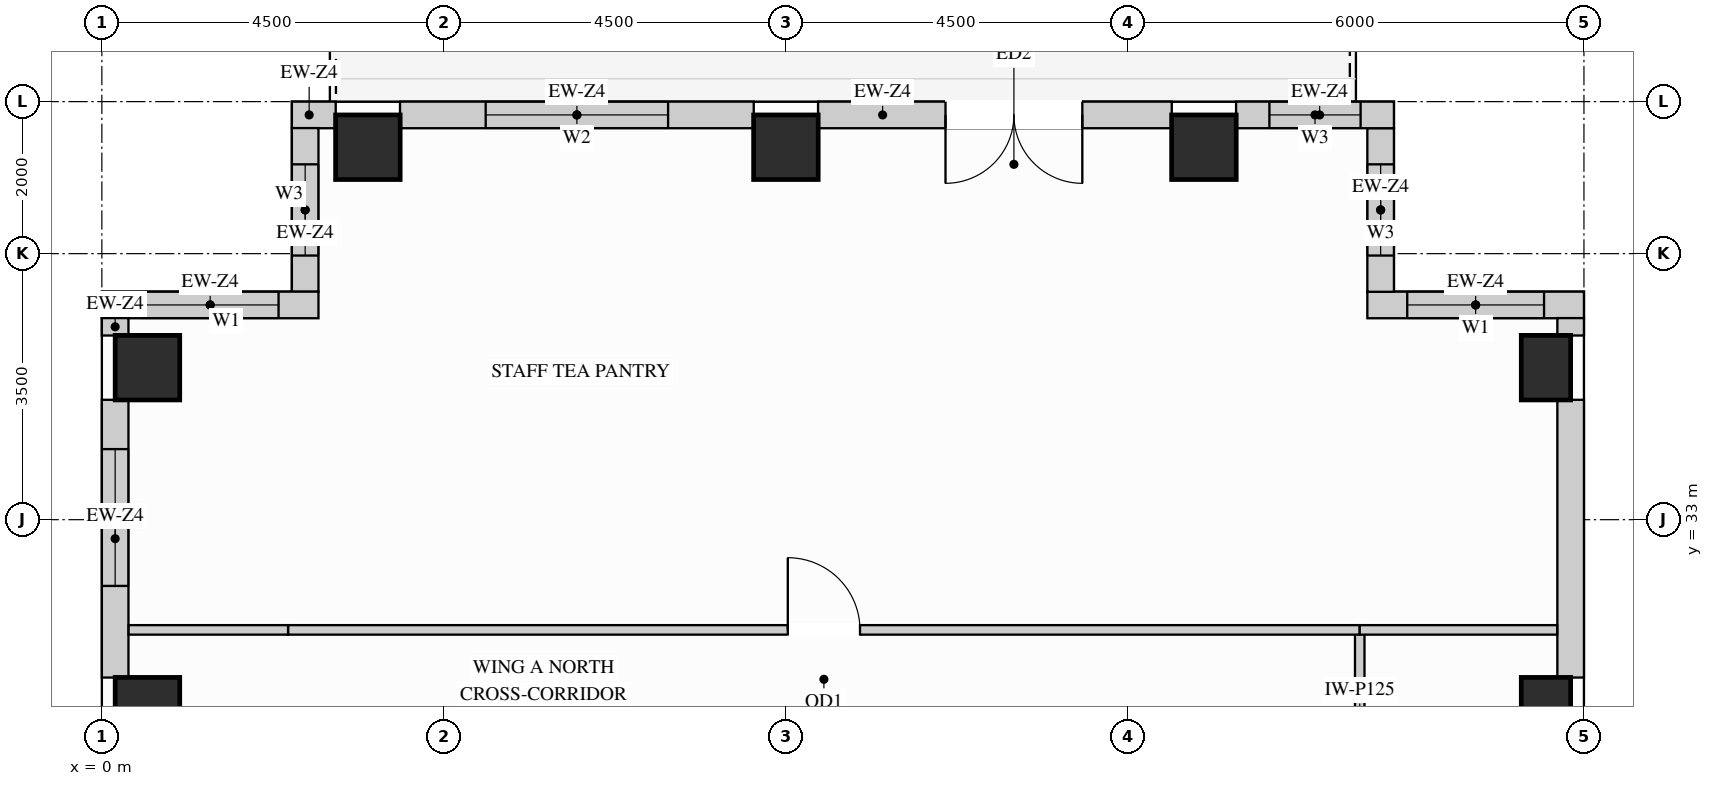
"""IFC4 building model, lengths in metres.
Left out: names, types, materials, properties, quantities, classifications, styles, units other than length and angle.
Written with IfcOpenShell. Run it as: python <this file> out.ifc"""

import sys

from ifc_helpers import new_model, si_unit, direction, frame, frame_2d, origin, origin_2d, place, context, subcontext, project, spatial, rectangle, extrude, source, transform, mapped, element, fill, save


model = new_model("IFC4")
c1 = context("Model", 3, precision=1e-05, world=origin(), true_north=direction((0.0, 1.0)))
c2 = subcontext(c1, "Body", "Model", "MODEL_VIEW")
j1 = project(units=[si_unit("LENGTHUNIT", "METRE"), si_unit("PLANEANGLEUNIT", "RADIAN")], contexts=[c1])
p1 = place(None, origin())
s1 = spatial("IfcSite", under=j1, at=p1, CompositionType="ELEMENT")
p2 = place(p1, origin())
s2 = spatial("IfcBuilding", under=s1, at=p2, CompositionType="ELEMENT")
p3 = place(p2, frame((0.0, 0.0, 212.4)))
s3 = spatial("IfcBuildingStorey", under=s2, at=p3, CompositionType="ELEMENT", Elevation=212.4)
m1 = source(origin(), c2, "Body", "SweptSolid", [
    extrude(rectangle(XDim=0.65, YDim=0.85, at=origin_2d()), origin(), (0.0, 0.0, 1.0), 3.4),
])
for number, where, z_axis, x_axis in (
    (1, (19.0, 30.5, 0.0), (0.0, 0.0, 1.0), (1.0, 0.0, 0.0)),
    (2, (19.0, 35.0, 0.0), (0.0, 0.0, 1.0), (1.0, 0.0, 0.0)),
):
    element("IfcColumn", number, at=place(p3, frame(where, z_axis=z_axis, x_axis=x_axis)), inside=s3, PredefinedType="COLUMN", context=c2, shape_type="MappedRepresentation", body=[
        mapped(m1, transform((0.0, 0.0, 0.0), x_axis=(1.0, 0.0, 0.0), y_axis=(0.0, 1.0, 0.0), z_axis=(0.0, 0.0, 1.0))),
    ])
m2 = source(origin(), c2, "Body", "SweptSolid", [
    extrude(rectangle(XDim=0.85, YDim=0.85, at=origin_2d()), origin(), (0.0, 0.0, 1.0), 3.4),
])
for number, where, z_axis, x_axis in (
    (3, (14.5, 37.9, 0.0), (0.0, 0.0, 1.0), (1.0, 0.0, 0.0)),
    (4, (3.5, 37.9, 0.0), (0.0, 0.0, 1.0), (1.0, 0.0, 0.0)),
    (5, (9.0, 37.9, 0.0), (0.0, 0.0, 1.0), (1.0, 0.0, 0.0)),
    (6, (0.6, 30.5, 0.0), (0.0, 0.0, 1.0), (1.0, 0.0, 0.0)),
    (7, (0.6, 35.0, 0.0), (0.0, 0.0, 1.0), (1.0, 0.0, 0.0)),
):
    element("IfcColumn", number, at=place(p3, frame(where, z_axis=z_axis, x_axis=x_axis)), inside=s3, PredefinedType="COLUMN", context=c2, shape_type="MappedRepresentation", body=[
        mapped(m2, transform((0.0, 0.0, 0.0), x_axis=(1.0, 0.0, 0.0), y_axis=(0.0, 1.0, 0.0), z_axis=(0.0, 0.0, 1.0))),
    ])
p4 = place(p3, frame((19.5, 35.825, 0.0), z_axis=(0.0, 0.0, 1.0), x_axis=(-1.0, 0.0, 0.0)))
e8 = element("IfcWall", 8, at=p4, inside=s3, PredefinedType="SOLIDWALL", context=c2, shape_type="SweptSolid", body=[
    extrude(rectangle(XDim=2.85, YDim=0.35, at=frame_2d((1.425, 0.0))), origin(), (0.0, 0.0, 1.0), 3.385),
])
p5 = place(p4, frame((0.525, 0.0, 0.78)))
e9 = element("IfcOpeningElement", 9, at=p5, cuts=e8, PredefinedType="OPENING", context=c2, shape_type="SweptSolid", body=[
    extrude(rectangle(XDim=1.8, YDim=2.1, at=frame_2d((0.9, 1.05))), frame((0.0, 0.185, 0.0), z_axis=(0.0, -1.0, 0.0), x_axis=(1.0, 0.0, 0.0)), (0.0, 0.0, 1.0), 0.37),
])
p6 = place(p3, frame((16.825, 35.998, 0.0), z_axis=(0.0, 0.0, 1.0), x_axis=(0.0, 1.0, 0.0)))
e10 = element("IfcWall", 10, at=p6, inside=s3, PredefinedType="SOLIDWALL", context=c2, shape_type="SweptSolid", body=[
    extrude(rectangle(XDim=2.154, YDim=0.35, at=frame_2d((1.077, 0.0))), origin(), (0.0, 0.0, 1.0), 3.385),
])
p7 = place(p6, frame((0.477, 0.0, 0.78)))
e11 = element("IfcOpeningElement", 11, at=p7, cuts=e10, PredefinedType="OPENING", context=c2, shape_type="SweptSolid", body=[
    extrude(rectangle(XDim=1.2, YDim=2.1, at=frame_2d((0.6, 1.05))), frame((0.0, 0.185, 0.0), z_axis=(0.0, -1.0, 0.0), x_axis=(1.0, 0.0, 0.0)), (0.0, 0.0, 1.0), 0.37),
])
p8 = place(p3, frame((17.0, 38.325, 0.0), z_axis=(0.0, 0.0, 1.0), x_axis=(-1.0, 0.0, 0.0)))
e12 = element("IfcWall", 12, at=p8, inside=s3, PredefinedType="SOLIDWALL", context=c2, shape_type="SweptSolid", body=[
    extrude(rectangle(XDim=2.077, YDim=0.35, at=frame_2d((1.039, 0.0))), origin(), (0.0, 0.0, 1.0), 3.385),
])
p9 = place(p8, frame((0.438, 0.0, 0.78)))
e13 = element("IfcOpeningElement", 13, at=p9, cuts=e12, PredefinedType="OPENING", context=c2, shape_type="SweptSolid", body=[
    extrude(rectangle(XDim=1.2, YDim=2.1, at=frame_2d((0.6, 1.05))), frame((0.0, 0.185, 0.0), z_axis=(0.0, -1.0, 0.0), x_axis=(1.0, 0.0, 0.0)), (0.0, 0.0, 1.0), 0.37),
])
p10 = place(p3, frame((14.077, 38.325, 0.0), z_axis=(0.0, 0.0, 1.0), x_axis=(-1.0, 0.0, 0.0)))
e14 = element("IfcWall", 14, at=p10, inside=s3, PredefinedType="SOLIDWALL", context=c2, shape_type="SweptSolid", body=[
    extrude(rectangle(XDim=4.654, YDim=0.35, at=frame_2d((2.327, 0.0))), origin(), (0.0, 0.0, 1.0), 3.385),
])
p11 = place(p10, frame((1.177, 0.0, 0.0)))
e15 = element("IfcOpeningElement", 15, at=p11, cuts=e14, PredefinedType="OPENING", context=c2, shape_type="SweptSolid", body=[
    extrude(rectangle(XDim=1.8, YDim=2.2, at=frame_2d((0.9, 1.1))), frame((0.0, 0.185, 0.0), z_axis=(0.0, -1.0, 0.0), x_axis=(1.0, 0.0, 0.0)), (0.0, 0.0, 1.0), 0.37),
])
p12 = place(p3, frame((8.577, 38.325, 0.0), z_axis=(0.0, 0.0, 1.0), x_axis=(-1.0, 0.0, 0.0)))
e16 = element("IfcWall", 16, at=p12, inside=s3, PredefinedType="SOLIDWALL", context=c2, shape_type="SweptSolid", body=[
    extrude(rectangle(XDim=4.654, YDim=0.35, at=frame_2d((2.327, 0.0))), origin(), (0.0, 0.0, 1.0), 3.385),
])
p13 = place(p12, frame((1.127, 0.0, 0.78)))
e17 = element("IfcOpeningElement", 17, at=p13, cuts=e16, PredefinedType="OPENING", context=c2, shape_type="SweptSolid", body=[
    extrude(rectangle(XDim=2.4, YDim=2.1, at=frame_2d((1.2, 1.05))), frame((0.0, 0.185, 0.0), z_axis=(0.0, -1.0, 0.0), x_axis=(1.0, 0.0, 0.0)), (0.0, 0.0, 1.0), 0.37),
])
m3 = source(origin(), c2, "Body", "SweptSolid", [
    extrude(rectangle(XDim=0.577, YDim=0.35, at=frame_2d((0.289, 0.0))), origin(), (0.0, 0.0, 1.0), 3.385),
])
p14 = place(p3, frame((3.077, 38.325, 0.0), z_axis=(0.0, 0.0, 1.0), x_axis=(-1.0, 0.0, 0.0)))
e18 = element("IfcWall", 18, at=p14, inside=s3, PredefinedType="SOLIDWALL", context=c2, shape_type="MappedRepresentation", body=[
    mapped(m3, transform((0.0, 0.0, 0.0), x_axis=(1.0, 0.0, 0.0), y_axis=(0.0, 1.0, 0.0), z_axis=(0.0, 0.0, 1.0))),
])
p15 = place(p3, frame((2.675, 38.152, 0.0), z_axis=(0.0, 0.0, 1.0), x_axis=(0.0, -1.0, 0.0)))
e19 = element("IfcWall", 19, at=p15, inside=s3, PredefinedType="SOLIDWALL", context=c2, shape_type="SweptSolid", body=[
    extrude(rectangle(XDim=2.154, YDim=0.35, at=frame_2d((1.077, 0.0))), origin(), (0.0, 0.0, 1.0), 3.385),
])
p16 = place(p15, frame((0.477, 0.0, 0.78)))
e20 = element("IfcOpeningElement", 20, at=p16, cuts=e19, PredefinedType="OPENING", context=c2, shape_type="SweptSolid", body=[
    extrude(rectangle(XDim=1.2, YDim=2.1, at=frame_2d((0.6, 1.05))), frame((0.0, 0.185, 0.0), z_axis=(0.0, -1.0, 0.0), x_axis=(1.0, 0.0, 0.0)), (0.0, 0.0, 1.0), 0.37),
])
p17 = place(p3, frame((2.85, 35.825, 0.0), z_axis=(0.0, 0.0, 1.0), x_axis=(-1.0, 0.0, 0.0)))
e21 = element("IfcWall", 21, at=p17, inside=s3, PredefinedType="SOLIDWALL", context=c2, shape_type="SweptSolid", body=[
    extrude(rectangle(XDim=2.85, YDim=0.35, at=frame_2d((1.425, 0.0))), origin(), (0.0, 0.0, 1.0), 3.385),
])
p18 = place(p17, frame((0.525, 0.0, 0.78)))
e22 = element("IfcOpeningElement", 22, at=p18, cuts=e21, PredefinedType="OPENING", context=c2, shape_type="SweptSolid", body=[
    extrude(rectangle(XDim=1.8, YDim=2.1, at=frame_2d((0.9, 1.05))), frame((0.0, 0.185, 0.0), z_axis=(0.0, -1.0, 0.0), x_axis=(1.0, 0.0, 0.0)), (0.0, 0.0, 1.0), 0.37),
])
m4 = source(origin(), c2, "Body", "SweptSolid", [
    extrude(rectangle(XDim=0.229, YDim=0.35, at=frame_2d((0.115, 0.0))), origin(), (0.0, 0.0, 1.0), 3.385),
])
p19 = place(p3, frame((0.175, 35.652, 0.0), z_axis=(0.0, 0.0, 1.0), x_axis=(0.0, -1.0, 0.0)))
e23 = element("IfcWall", 23, at=p19, inside=s3, PredefinedType="SOLIDWALL", context=c2, shape_type="MappedRepresentation", body=[
    mapped(m4, transform((0.0, 0.0, 0.0), x_axis=(1.0, 0.0, 0.0), y_axis=(0.0, 1.0, 0.0), z_axis=(0.0, 0.0, 1.0))),
])
p20 = place(p3, frame((0.175, 34.577, 0.0), z_axis=(0.0, 0.0, 1.0), x_axis=(0.0, -1.0, 0.0)))
e24 = element("IfcWall", 24, at=p20, inside=s3, PredefinedType="SOLIDWALL", context=c2, shape_type="SweptSolid", body=[
    extrude(rectangle(XDim=3.654, YDim=0.35, at=frame_2d((1.827, 0.0))), origin(), (0.0, 0.0, 1.0), 3.385),
])
p21 = place(p20, frame((0.648, 0.0, 0.78)))
e25 = element("IfcOpeningElement", 25, at=p21, cuts=e24, PredefinedType="OPENING", context=c2, shape_type="SweptSolid", body=[
    extrude(rectangle(XDim=1.8, YDim=2.1, at=frame_2d((0.9, 1.05))), frame((0.0, 0.185, 0.0), z_axis=(0.0, -1.0, 0.0), x_axis=(1.0, 0.0, 0.0)), (0.0, 0.0, 1.0), 0.37),
])
m5 = source(origin(), c2, "Body", "SweptSolid", [
    extrude(rectangle(XDim=3.654, YDim=0.35, at=frame_2d((1.827, 0.0))), origin(), (0.0, 0.0, 1.0), 2.619),
])
p22 = place(p3, frame((19.325, 30.923, 0.0), z_axis=(0.0, 0.0, 1.0), x_axis=(0.0, 1.0, 0.0)))
e26 = element("IfcWall", 26, at=p22, inside=s3, PredefinedType="SOLIDWALL", context=c2, shape_type="MappedRepresentation", body=[
    mapped(m5, transform((0.0, 0.0, 0.0), x_axis=(1.0, 0.0, 0.0), y_axis=(0.0, 1.0, 0.0), z_axis=(0.0, 0.0, 1.0))),
])
p23 = place(p3, frame((19.325, 35.423, 0.0), z_axis=(0.0, 0.0, 1.0), x_axis=(0.0, 1.0, 0.0)))
e27 = element("IfcWall", 27, at=p23, inside=s3, PredefinedType="SOLIDWALL", context=c2, shape_type="MappedRepresentation", body=[
    mapped(m4, transform((0.0, 0.0, 0.0), x_axis=(1.0, 0.0, 0.0), y_axis=(0.0, 1.0, 0.0), z_axis=(0.0, 0.0, 1.0))),
])
p24 = place(p3, frame((16.55, 26.05, 0.0), z_axis=(0.0, 0.0, 1.0), x_axis=(0.0, 1.0, 0.0)))
e28 = element("IfcWall", 28, at=p24, inside=s3, PredefinedType="PARTITIONING", context=c2, shape_type="SweptSolid", body=[
    extrude(rectangle(XDim=5.5, YDim=0.125, at=frame_2d((2.75, 0.0))), origin(), (0.0, 0.0, 1.0), 3.385),
])
p25 = place(p24, frame((2.275, 0.0, 0.0)))
e29 = element("IfcOpeningElement", 29, at=p25, cuts=e28, PredefinedType="OPENING", context=c2, shape_type="SweptSolid", body=[
    extrude(rectangle(XDim=0.95, YDim=2.15, at=frame_2d((0.475, 1.075))), frame((0.0, 0.073, 0.0), z_axis=(0.0, -1.0, 0.0), x_axis=(1.0, 0.0, 0.0)), (0.0, 0.0, 1.0), 0.145),
])
p26 = place(p3, frame((2.45, 31.55, 0.0), z_axis=(0.0, 0.0, 1.0), x_axis=(1.0, 0.0, 0.0)))
e30 = element("IfcWall", 30, at=p26, inside=s3, PredefinedType="PARTITIONING", context=c2, shape_type="SweptSolid", body=[
    extrude(rectangle(XDim=14.1, YDim=0.125, at=frame_2d((7.05, 0.0))), origin(), (0.0, 0.0, 1.0), 3.385),
])
p27 = place(p26, frame((6.575, 0.0, 0.0)))
e31 = element("IfcOpeningElement", 31, at=p27, cuts=e30, PredefinedType="OPENING", context=c2, shape_type="SweptSolid", body=[
    extrude(rectangle(XDim=0.95, YDim=2.15, at=frame_2d((0.475, 1.075))), frame((0.0, 0.073, 0.0), z_axis=(0.0, -1.0, 0.0), x_axis=(1.0, 0.0, 0.0)), (0.0, 0.0, 1.0), 0.145),
])
m6 = source(origin(), c2, "Body", "SweptSolid", [
    extrude(rectangle(XDim=2.598, YDim=0.125, at=frame_2d((1.299, 0.0))), origin(), (0.0, 0.0, 1.0), 3.385),
])
p28 = place(p3, frame((16.55, 31.55, 0.0), z_axis=(0.0, 0.0, 1.0), x_axis=(1.0, 0.0, 0.0)))
e32 = element("IfcWall", 32, at=p28, inside=s3, PredefinedType="PARTITIONING", context=c2, shape_type="MappedRepresentation", body=[
    mapped(m6, transform((0.0, 0.0, 0.0), x_axis=(1.0, 0.0, 0.0), y_axis=(0.0, 1.0, 0.0), z_axis=(0.0, 0.0, 1.0))),
])
m7 = source(origin(), c2, "Body", "SweptSolid", [
    extrude(rectangle(XDim=2.098, YDim=0.125, at=frame_2d((1.049, 0.0))), origin(), (0.0, 0.0, 1.0), 3.385),
])
p29 = place(p3, frame((0.352, 31.55, 0.0), z_axis=(0.0, 0.0, 1.0), x_axis=(1.0, 0.0, 0.0)))
e33 = element("IfcWall", 33, at=p29, inside=s3, PredefinedType="PARTITIONING", context=c2, shape_type="MappedRepresentation", body=[
    mapped(m7, transform((0.0, 0.0, 0.0), x_axis=(1.0, 0.0, 0.0), y_axis=(0.0, 1.0, 0.0), z_axis=(0.0, 0.0, 1.0))),
])
m8 = source(origin(), c2, "Body", "SweptSolid", [
    extrude(rectangle(XDim=1.8, YDim=2.2, at=frame_2d((0.9, 1.1))), frame((0.0, 0.025, 0.0), z_axis=(0.0, -1.0, 0.0), x_axis=(1.0, 0.0, 0.0)), (0.0, 0.0, 1.0), 0.05),
])
p30 = place(p11, frame((1.8, 0.0, 0.0), z_axis=(0.0, 0.0, 1.0), x_axis=(-1.0, 0.0, 0.0)))
e34 = element("IfcDoor", 34, at=p30, inside=s3, OperationType="DOUBLE_DOOR_SINGLE_SWING", PredefinedType="DOOR", context=c2, shape_type="MappedRepresentation", body=[
    mapped(m8, transform((0.0, 0.0, 0.0), x_axis=(1.0, 0.0, 0.0), y_axis=(0.0, 1.0, 0.0), z_axis=(0.0, 0.0, 1.0))),
])
fill(e15, e34)
m9 = source(origin(), c2, "Body", "SweptSolid", [
    extrude(rectangle(XDim=0.95, YDim=2.15, at=frame_2d((0.475, 1.075))), frame((0.0, 0.025, 0.0), z_axis=(0.0, -1.0, 0.0), x_axis=(1.0, 0.0, 0.0)), (0.0, 0.0, 1.0), 0.05),
])
p31 = place(p27, origin())
e35 = element("IfcDoor", 35, at=p31, inside=s3, OperationType="SINGLE_SWING_LEFT", PredefinedType="DOOR", context=c2, shape_type="MappedRepresentation", body=[
    mapped(m9, transform((0.0, 0.0, 0.0), x_axis=(1.0, 0.0, 0.0), y_axis=(0.0, 1.0, 0.0), z_axis=(0.0, 0.0, 1.0))),
])
fill(e31, e35)
m10 = source(origin(), c2, "Body", "SweptSolid", [
    extrude(rectangle(XDim=1.8, YDim=2.1, at=frame_2d((0.9, 1.05))), frame((0.0, 0.03, 0.0), z_axis=(0.0, -1.0, 0.0), x_axis=(1.0, 0.0, 0.0)), (0.0, 0.0, 1.0), 0.06),
])
p32 = place(p5, origin())
e36 = element("IfcWindow", 36, at=p32, inside=s3, PartitioningType="SINGLE_PANEL", PredefinedType="WINDOW", context=c2, shape_type="MappedRepresentation", body=[
    mapped(m10, transform((0.0, 0.0, 0.0), x_axis=(1.0, 0.0, 0.0), y_axis=(0.0, 1.0, 0.0), z_axis=(0.0, 0.0, 1.0))),
])
fill(e9, e36)
p33 = place(p18, origin())
e37 = element("IfcWindow", 37, at=p33, inside=s3, PartitioningType="SINGLE_PANEL", PredefinedType="WINDOW", context=c2, shape_type="MappedRepresentation", body=[
    mapped(m10, transform((0.0, 0.0, 0.0), x_axis=(1.0, 0.0, 0.0), y_axis=(0.0, 1.0, 0.0), z_axis=(0.0, 0.0, 1.0))),
])
fill(e22, e37)
p34 = place(p21, origin())
e38 = element("IfcWindow", 38, at=p34, inside=s3, PartitioningType="SINGLE_PANEL", PredefinedType="WINDOW", context=c2, shape_type="MappedRepresentation", body=[
    mapped(m10, transform((0.0, 0.0, 0.0), x_axis=(1.0, 0.0, 0.0), y_axis=(0.0, 1.0, 0.0), z_axis=(0.0, 0.0, 1.0))),
])
fill(e25, e38)
m11 = source(origin(), c2, "Body", "SweptSolid", [
    extrude(rectangle(XDim=2.4, YDim=2.1, at=frame_2d((1.2, 1.05))), frame((0.0, 0.03, 0.0), z_axis=(0.0, -1.0, 0.0), x_axis=(1.0, 0.0, 0.0)), (0.0, 0.0, 1.0), 0.06),
])
p35 = place(p13, origin())
e39 = element("IfcWindow", 39, at=p35, inside=s3, PartitioningType="SINGLE_PANEL", PredefinedType="WINDOW", context=c2, shape_type="MappedRepresentation", body=[
    mapped(m11, transform((0.0, 0.0, 0.0), x_axis=(1.0, 0.0, 0.0), y_axis=(0.0, 1.0, 0.0), z_axis=(0.0, 0.0, 1.0))),
])
fill(e17, e39)
m12 = source(origin(), c2, "Body", "SweptSolid", [
    extrude(rectangle(XDim=1.2, YDim=2.1, at=frame_2d((0.6, 1.05))), frame((0.0, 0.03, 0.0), z_axis=(0.0, -1.0, 0.0), x_axis=(1.0, 0.0, 0.0)), (0.0, 0.0, 1.0), 0.06),
])
p36 = place(p7, origin())
e40 = element("IfcWindow", 40, at=p36, inside=s3, PartitioningType="SINGLE_PANEL", PredefinedType="WINDOW", context=c2, shape_type="MappedRepresentation", body=[
    mapped(m12, transform((0.0, 0.0, 0.0), x_axis=(1.0, 0.0, 0.0), y_axis=(0.0, 1.0, 0.0), z_axis=(0.0, 0.0, 1.0))),
])
fill(e11, e40)
p37 = place(p9, origin())
e41 = element("IfcWindow", 41, at=p37, inside=s3, PartitioningType="SINGLE_PANEL", PredefinedType="WINDOW", context=c2, shape_type="MappedRepresentation", body=[
    mapped(m12, transform((0.0, 0.0, 0.0), x_axis=(1.0, 0.0, 0.0), y_axis=(0.0, 1.0, 0.0), z_axis=(0.0, 0.0, 1.0))),
])
fill(e13, e41)
p38 = place(p16, origin())
e42 = element("IfcWindow", 42, at=p38, inside=s3, PartitioningType="SINGLE_PANEL", PredefinedType="WINDOW", context=c2, shape_type="MappedRepresentation", body=[
    mapped(m12, transform((0.0, 0.0, 0.0), x_axis=(1.0, 0.0, 0.0), y_axis=(0.0, 1.0, 0.0), z_axis=(0.0, 0.0, 1.0))),
])
fill(e20, e42)
save(model, sys.argv[1])
